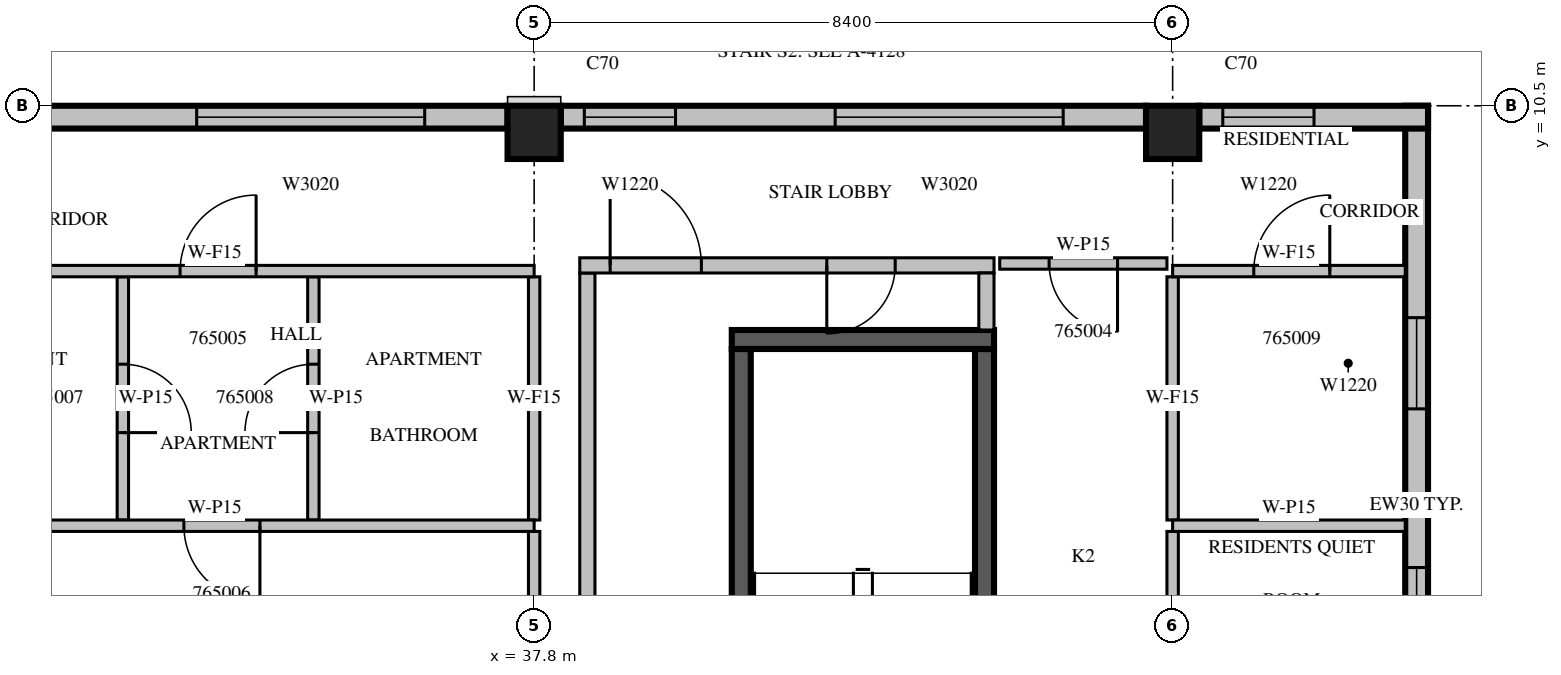
"""IFC4 building model, lengths in metres.
Left out: names, types, materials, properties, quantities, classifications, styles, units other than length and angle.
Written with IfcOpenShell. Run it as: python <this file> out.ifc"""

import sys

from ifc_helpers import new_model, si_unit, direction, frame, frame_2d, origin, origin_2d, place, context, subcontext, project, spatial, rectangle, extrude, source, transform, mapped, element, fill, save


model = new_model("IFC4")
c1 = context("Model", 3, precision=1e-05, world=origin(), true_north=direction((0.0, 1.0)))
c2 = subcontext(c1, "Body", "Model", "MODEL_VIEW")
j1 = project(units=[si_unit("LENGTHUNIT", "METRE"), si_unit("PLANEANGLEUNIT", "RADIAN")], contexts=[c1])
p1 = place(None, origin())
s1 = spatial("IfcSite", under=j1, at=p1, CompositionType="ELEMENT")
p2 = place(p1, origin())
s2 = spatial("IfcBuilding", under=s1, at=p2, CompositionType="ELEMENT")
p3 = place(p2, frame((0.0, 0.0, 288.0)))
s3 = spatial("IfcBuildingStorey", under=s2, at=p3, CompositionType="ELEMENT", Elevation=288.0)
m1 = source(origin(), c2, "Body", "SweptSolid", [
    extrude(rectangle(XDim=0.7, YDim=0.7, at=origin_2d()), origin(), (0.0, 0.0, 1.0), 3.5),
])
for number, where, z_axis, x_axis in (
    (1, (37.8, 10.15, 0.0), (0.0, 0.0, 1.0), (1.0, 0.0, 0.0)),
    (2, (46.2, 10.15, 0.0), (0.0, 0.0, 1.0), (1.0, 0.0, 0.0)),
):
    element("IfcColumn", number, at=place(p3, frame(where, z_axis=z_axis, x_axis=x_axis)), inside=s3, PredefinedType="COLUMN", context=c2, shape_type="MappedRepresentation", body=[
        mapped(m1, transform((0.0, 0.0, 0.0), scale=1.0)),
    ])
m2 = source(origin(), c2, "Body", "SweptSolid", [
    extrude(rectangle(XDim=10.5, YDim=0.3, at=frame_2d((5.25, 0.0))), origin(), (0.0, 0.0, 1.0), 3.1),
])
p4 = place(p3, frame((49.41, 0.0, 0.0), z_axis=(0.0, 0.0, 1.0), x_axis=(0.0, 1.0, 0.0)))
e3 = element("IfcWall", 3, at=p4, inside=s3, PredefinedType="STANDARD", context=c2, shape_type="MappedRepresentation", body=[
    mapped(m2, transform((0.0, 0.0, 0.0), scale=1.0)),
])
m3 = source(origin(), c2, "Body", "SweptSolid", [
    extrude(rectangle(XDim=3.6, YDim=2.0, at=frame_2d((1.8, 1.0))), frame((0.0, 0.16, 0.0), z_axis=(0.0, -1.0, 0.0), x_axis=(1.0, 0.0, 0.0)), (0.0, 0.0, 1.0), 0.32),
])
p5 = place(p4, frame((0.825, 0.0, 0.6)))
e4 = element("IfcOpeningElement", 4, at=p5, cuts=e3, PredefinedType="OPENING", context=c2, shape_type="MappedRepresentation", body=[
    mapped(m3, transform((0.0, 0.0, 0.0), scale=1.0)),
])
m4 = source(origin(), c2, "Body", "SweptSolid", [
    extrude(rectangle(XDim=1.2, YDim=2.0, at=frame_2d((0.6, 1.0))), frame((0.0, 0.16, 0.0), z_axis=(0.0, -1.0, 0.0), x_axis=(1.0, 0.0, 0.0)), (0.0, 0.0, 1.0), 0.32),
])
p6 = place(p4, frame((6.513, 0.0, 0.6)))
e5 = element("IfcOpeningElement", 5, at=p6, cuts=e3, PredefinedType="OPENING", context=c2, shape_type="MappedRepresentation", body=[
    mapped(m4, transform((0.0, 0.0, 0.0), scale=1.0)),
])
m5 = source(origin(), c2, "Body", "SweptSolid", [
    extrude(rectangle(XDim=3.01, YDim=0.3, at=frame_2d((1.505, 0.0))), origin(), (0.0, 0.0, 1.0), 3.1),
])
p7 = place(p3, frame((49.56, 10.35, 0.0), z_axis=(0.0, 0.0, 1.0), x_axis=(-1.0, 0.0, 0.0)))
e6 = element("IfcWall", 6, at=p7, inside=s3, PredefinedType="STANDARD", context=c2, shape_type="MappedRepresentation", body=[
    mapped(m5, transform((0.0, 0.0, 0.0), scale=1.0)),
])
p8 = place(p7, frame((1.5, 0.0, 0.6)))
e7 = element("IfcOpeningElement", 7, at=p8, cuts=e6, PredefinedType="OPENING", context=c2, shape_type="MappedRepresentation", body=[
    mapped(m4, transform((0.0, 0.0, 0.0), scale=1.0)),
])
m6 = source(origin(), c2, "Body", "SweptSolid", [
    extrude(rectangle(XDim=7.7, YDim=0.3, at=frame_2d((3.85, 0.0))), origin(), (0.0, 0.0, 1.0), 3.1),
])
p9 = place(p3, frame((45.85, 10.35, 0.0), z_axis=(0.0, 0.0, 1.0), x_axis=(-1.0, 0.0, 0.0)))
e8 = element("IfcWall", 8, at=p9, inside=s3, PredefinedType="STANDARD", context=c2, shape_type="MappedRepresentation", body=[
    mapped(m6, transform((0.0, 0.0, 0.0), scale=1.0)),
])
m7 = source(origin(), c2, "Body", "SweptSolid", [
    extrude(rectangle(XDim=3.0, YDim=2.0, at=frame_2d((1.5, 1.0))), frame((0.0, 0.16, 0.0), z_axis=(0.0, -1.0, 0.0), x_axis=(1.0, 0.0, 0.0)), (0.0, 0.0, 1.0), 0.32),
])
p10 = place(p9, frame((1.09, 0.0, 0.6)))
e9 = element("IfcOpeningElement", 9, at=p10, cuts=e8, PredefinedType="OPENING", context=c2, shape_type="MappedRepresentation", body=[
    mapped(m7, transform((0.0, 0.0, 0.0), scale=1.0)),
])
p11 = place(p9, frame((6.19, 0.0, 0.6)))
e10 = element("IfcOpeningElement", 10, at=p11, cuts=e8, PredefinedType="OPENING", context=c2, shape_type="MappedRepresentation", body=[
    mapped(m4, transform((0.0, 0.0, 0.0), scale=1.0)),
])
p12 = place(p3, frame((37.45, 10.35, 0.0), z_axis=(0.0, 0.0, 1.0), x_axis=(-1.0, 0.0, 0.0)))
e11 = element("IfcWall", 11, at=p12, inside=s3, PredefinedType="STANDARD", context=c2, shape_type="MappedRepresentation", body=[
    mapped(m6, transform((0.0, 0.0, 0.0), scale=1.0)),
])
p13 = place(p12, frame((1.09, 0.0, 0.6)))
e12 = element("IfcOpeningElement", 12, at=p13, cuts=e11, PredefinedType="OPENING", context=c2, shape_type="MappedRepresentation", body=[
    mapped(m7, transform((0.0, 0.0, 0.0), scale=1.0)),
])
p14 = place(p12, frame((6.19, 0.0, 0.6)))
e13 = element("IfcOpeningElement", 13, at=p14, cuts=e11, PredefinedType="OPENING", context=c2, shape_type="MappedRepresentation", body=[
    mapped(m4, transform((0.0, 0.0, 0.0), scale=1.0)),
])
m8 = source(origin(), c2, "Body", "SweptSolid", [
    extrude(rectangle(XDim=7.0, YDim=0.25, at=frame_2d((3.5, 0.0))), origin(), (0.0, 0.0, 1.0), 3.1),
])
p15 = place(p3, frame((40.525, 0.3, 0.0), z_axis=(0.0, 0.0, 1.0), x_axis=(0.0, 1.0, 0.0)))
e14 = element("IfcWall", 14, at=p15, inside=s3, PredefinedType="SOLIDWALL", context=c2, shape_type="MappedRepresentation", body=[
    mapped(m8, transform((0.0, 0.0, 0.0), scale=1.0)),
])
m9 = source(origin(), c2, "Body", "SweptSolid", [
    extrude(rectangle(XDim=1.1, YDim=2.1, at=frame_2d((0.55, 1.05))), frame((0.0, 0.135, 0.0), z_axis=(0.0, -1.0, 0.0), x_axis=(1.0, 0.0, 0.0)), (0.0, 0.0, 1.0), 0.27),
])
p16 = place(p15, frame((0.55, 0.0, 0.0)))
e15 = element("IfcOpeningElement", 15, at=p16, cuts=e14, PredefinedType="OPENING", context=c2, shape_type="MappedRepresentation", body=[
    mapped(m9, transform((0.0, 0.0, 0.0), scale=1.0)),
])
p17 = place(p3, frame((43.725, 0.3, 0.0), z_axis=(0.0, 0.0, 1.0), x_axis=(0.0, 1.0, 0.0)))
e16 = element("IfcWall", 16, at=p17, inside=s3, PredefinedType="SOLIDWALL", context=c2, shape_type="MappedRepresentation", body=[
    mapped(m8, transform((0.0, 0.0, 0.0), scale=1.0)),
])
m10 = source(origin(), c2, "Body", "SweptSolid", [
    extrude(rectangle(XDim=3.45, YDim=0.25, at=frame_2d((1.725, 0.0))), origin(), (0.0, 0.0, 1.0), 3.1),
])
p18 = place(p3, frame((40.4, 7.425, 0.0), z_axis=(0.0, 0.0, 1.0), x_axis=(1.0, 0.0, 0.0)))
e17 = element("IfcWall", 17, at=p18, inside=s3, PredefinedType="SOLIDWALL", context=c2, shape_type="MappedRepresentation", body=[
    mapped(m10, transform((0.0, 0.0, 0.0), scale=1.0)),
])
m11 = source(origin(), c2, "Body", "SweptSolid", [
    extrude(rectangle(XDim=8.0, YDim=0.2, at=frame_2d((4.0, 0.0))), origin(), (0.0, 0.0, 1.0), 3.1),
])
p19 = place(p3, frame((38.5, 0.3, 0.0), z_axis=(0.0, 0.0, 1.0), x_axis=(0.0, 1.0, 0.0)))
e18 = element("IfcWall", 18, at=p19, inside=s3, PredefinedType="PARTITIONING", context=c2, shape_type="MappedRepresentation", body=[
    mapped(m11, transform((0.0, 0.0, 0.0), scale=1.0)),
])
m12 = source(origin(), c2, "Body", "SweptSolid", [
    extrude(rectangle(XDim=5.45, YDim=0.2, at=frame_2d((2.725, 0.0))), origin(), (0.0, 0.0, 1.0), 3.1),
])
p20 = place(p3, frame((38.4, 8.4, 0.0), z_axis=(0.0, 0.0, 1.0), x_axis=(1.0, 0.0, 0.0)))
e19 = element("IfcWall", 19, at=p20, inside=s3, PredefinedType="PARTITIONING", context=c2, shape_type="MappedRepresentation", body=[
    mapped(m12, transform((0.0, 0.0, 0.0), scale=1.0)),
])
m13 = source(origin(), c2, "Body", "SweptSolid", [
    extrude(rectangle(XDim=1.2, YDim=2.1, at=frame_2d((0.6, 1.05))), frame((0.0, 0.11, 0.0), z_axis=(0.0, -1.0, 0.0), x_axis=(1.0, 0.0, 0.0)), (0.0, 0.0, 1.0), 0.22),
])
p21 = place(p20, frame((0.4, 0.0, 0.0)))
e20 = element("IfcOpeningElement", 20, at=p21, cuts=e19, PredefinedType="OPENING", context=c2, shape_type="MappedRepresentation", body=[
    mapped(m13, transform((0.0, 0.0, 0.0), scale=1.0)),
])
m14 = source(origin(), c2, "Body", "SweptSolid", [
    extrude(rectangle(XDim=0.9, YDim=2.1, at=frame_2d((0.45, 1.05))), frame((0.0, 0.11, 0.0), z_axis=(0.0, -1.0, 0.0), x_axis=(1.0, 0.0, 0.0)), (0.0, 0.0, 1.0), 0.22),
])
p22 = place(p20, frame((3.25, 0.0, 0.0)))
e21 = element("IfcOpeningElement", 21, at=p22, cuts=e19, PredefinedType="OPENING", context=c2, shape_type="MappedRepresentation", body=[
    mapped(m14, transform((0.0, 0.0, 0.0), scale=1.0)),
])
m15 = source(origin(), c2, "Body", "SweptSolid", [
    extrude(rectangle(XDim=0.75, YDim=0.2, at=frame_2d((0.375, 0.0))), origin(), (0.0, 0.0, 1.0), 3.1),
])
p23 = place(p3, frame((43.75, 7.55, 0.0), z_axis=(0.0, 0.0, 1.0), x_axis=(0.0, 1.0, 0.0)))
e22 = element("IfcWall", 22, at=p23, inside=s3, PredefinedType="PARTITIONING", context=c2, shape_type="MappedRepresentation", body=[
    mapped(m15, transform((0.0, 0.0, 0.0), scale=1.0)),
])
m16 = source(origin(), c2, "Body", "SweptSolid", [
    extrude(rectangle(XDim=2.2, YDim=0.15, at=frame_2d((1.1, 0.0))), origin(), (0.0, 0.0, 1.0), 3.1),
])
p24 = place(p3, frame((46.125, 8.425, 0.0), z_axis=(0.0, 0.0, 1.0), x_axis=(-1.0, 0.0, 0.0)))
e23 = element("IfcWall", 23, at=p24, inside=s3, PredefinedType="PARTITIONING", context=c2, shape_type="MappedRepresentation", body=[
    mapped(m16, transform((0.0, 0.0, 0.0), scale=1.0)),
])
m17 = source(origin(), c2, "Body", "SweptSolid", [
    extrude(rectangle(XDim=0.9, YDim=2.1, at=frame_2d((0.45, 1.05))), frame((0.0, 0.085, 0.0), z_axis=(0.0, -1.0, 0.0), x_axis=(1.0, 0.0, 0.0)), (0.0, 0.0, 1.0), 0.17),
])
p25 = place(p24, frame((0.65, 0.0, 0.0)))
e24 = element("IfcOpeningElement", 24, at=p25, cuts=e23, PredefinedType="OPENING", context=c2, shape_type="MappedRepresentation", body=[
    mapped(m17, transform((0.0, 0.0, 0.0), scale=1.0)),
])
m18 = source(origin(), c2, "Body", "SweptSolid", [
    extrude(rectangle(XDim=3.2, YDim=0.15, at=frame_2d((1.6, 0.0))), origin(), (0.0, 0.0, 1.0), 3.1),
])
p26 = place(p3, frame((32.389, 5.05, 0.0), z_axis=(0.0, 0.0, 1.0), x_axis=(0.0, 1.0, 0.0)))
e25 = element("IfcWall", 25, at=p26, inside=s3, PredefinedType="PARTITIONING", context=c2, shape_type="MappedRepresentation", body=[
    mapped(m18, transform((0.0, 0.0, 0.0), scale=1.0)),
])
p27 = place(p26, frame((1.15, 0.0, 0.0)))
e26 = element("IfcOpeningElement", 26, at=p27, cuts=e25, PredefinedType="OPENING", context=c2, shape_type="MappedRepresentation", body=[
    mapped(m17, transform((0.0, 0.0, 0.0), scale=1.0)),
])
p28 = place(p3, frame((34.895, 5.05, 0.0), z_axis=(0.0, 0.0, 1.0), x_axis=(0.0, 1.0, 0.0)))
e27 = element("IfcWall", 27, at=p28, inside=s3, PredefinedType="PARTITIONING", context=c2, shape_type="MappedRepresentation", body=[
    mapped(m18, transform((0.0, 0.0, 0.0), scale=1.0)),
])
p29 = place(p28, frame((1.15, 0.0, 0.0)))
e28 = element("IfcOpeningElement", 28, at=p29, cuts=e27, PredefinedType="OPENING", context=c2, shape_type="MappedRepresentation", body=[
    mapped(m17, transform((0.0, 0.0, 0.0), scale=1.0)),
])
m19 = source(origin(), c2, "Body", "SweptSolid", [
    extrude(rectangle(XDim=4.201, YDim=0.15, at=frame_2d((2.1, 0.0))), origin(), (0.0, 0.0, 1.0), 3.1),
])
p30 = place(p3, frame((37.8, 0.699, 0.0), z_axis=(0.0, 0.0, 1.0), x_axis=(0.0, 1.0, 0.0)))
e29 = element("IfcWall", 29, at=p30, inside=s3, PredefinedType="PARTITIONING", context=c2, shape_type="MappedRepresentation", body=[
    mapped(m19, transform((0.0, 0.0, 0.0), scale=1.0)),
])
p31 = place(p3, frame((37.8, 5.05, 0.0), z_axis=(0.0, 0.0, 1.0), x_axis=(0.0, 1.0, 0.0)))
e30 = element("IfcWall", 30, at=p31, inside=s3, PredefinedType="PARTITIONING", context=c2, shape_type="MappedRepresentation", body=[
    mapped(m18, transform((0.0, 0.0, 0.0), scale=1.0)),
])
m20 = source(origin(), c2, "Body", "SweptSolid", [
    extrude(rectangle(XDim=8.4, YDim=0.15, at=frame_2d((4.2, 0.0))), origin(), (0.0, 0.0, 1.0), 3.1),
])
p32 = place(p3, frame((37.8, 4.975, 0.0), z_axis=(0.0, 0.0, 1.0), x_axis=(-1.0, 0.0, 0.0)))
e31 = element("IfcWall", 31, at=p32, inside=s3, PredefinedType="PARTITIONING", context=c2, shape_type="MappedRepresentation", body=[
    mapped(m20, transform((0.0, 0.0, 0.0), scale=1.0)),
])
m21 = source(origin(), c2, "Body", "SweptSolid", [
    extrude(rectangle(XDim=1.0, YDim=2.1, at=frame_2d((0.5, 1.05))), frame((0.0, 0.085, 0.0), z_axis=(0.0, -1.0, 0.0), x_axis=(1.0, 0.0, 0.0)), (0.0, 0.0, 1.0), 0.17),
])
p33 = place(p32, frame((3.608, 0.0, 0.0)))
e32 = element("IfcOpeningElement", 32, at=p33, cuts=e31, PredefinedType="OPENING", context=c2, shape_type="MappedRepresentation", body=[
    mapped(m21, transform((0.0, 0.0, 0.0), scale=1.0)),
])
p34 = place(p3, frame((46.2, 0.699, 0.0), z_axis=(0.0, 0.0, 1.0), x_axis=(0.0, 1.0, 0.0)))
e33 = element("IfcWall", 33, at=p34, inside=s3, PredefinedType="PARTITIONING", context=c2, shape_type="MappedRepresentation", body=[
    mapped(m19, transform((0.0, 0.0, 0.0), scale=1.0)),
])
p35 = place(p3, frame((46.2, 5.05, 0.0), z_axis=(0.0, 0.0, 1.0), x_axis=(0.0, 1.0, 0.0)))
e34 = element("IfcWall", 34, at=p35, inside=s3, PredefinedType="PARTITIONING", context=c2, shape_type="MappedRepresentation", body=[
    mapped(m18, transform((0.0, 0.0, 0.0), scale=1.0)),
])
m22 = source(origin(), c2, "Body", "SweptSolid", [
    extrude(rectangle(XDim=3.06, YDim=0.15, at=frame_2d((1.53, 0.0))), origin(), (0.0, 0.0, 1.0), 3.1),
])
p36 = place(p3, frame((49.26, 4.975, 0.0), z_axis=(0.0, 0.0, 1.0), x_axis=(-1.0, 0.0, 0.0)))
e35 = element("IfcWall", 35, at=p36, inside=s3, PredefinedType="PARTITIONING", context=c2, shape_type="MappedRepresentation", body=[
    mapped(m22, transform((0.0, 0.0, 0.0), scale=1.0)),
])
p37 = place(p3, frame((37.8, 8.325, 0.0), z_axis=(0.0, 0.0, 1.0), x_axis=(-1.0, 0.0, 0.0)))
e36 = element("IfcWall", 36, at=p37, inside=s3, PredefinedType="PARTITIONING", context=c2, shape_type="MappedRepresentation", body=[
    mapped(m20, transform((0.0, 0.0, 0.0), scale=1.0)),
])
p38 = place(p37, frame((3.658, 0.0, 0.0)))
e37 = element("IfcOpeningElement", 37, at=p38, cuts=e36, PredefinedType="OPENING", context=c2, shape_type="MappedRepresentation", body=[
    mapped(m21, transform((0.0, 0.0, 0.0), scale=1.0)),
])
p39 = place(p3, frame((49.26, 8.325, 0.0), z_axis=(0.0, 0.0, 1.0), x_axis=(-1.0, 0.0, 0.0)))
e38 = element("IfcWall", 38, at=p39, inside=s3, PredefinedType="PARTITIONING", context=c2, shape_type="MappedRepresentation", body=[
    mapped(m22, transform((0.0, 0.0, 0.0), scale=1.0)),
])
p40 = place(p39, frame((0.993, 0.0, 0.0)))
e39 = element("IfcOpeningElement", 39, at=p40, cuts=e38, PredefinedType="OPENING", context=c2, shape_type="MappedRepresentation", body=[
    mapped(m21, transform((0.0, 0.0, 0.0), scale=1.0)),
])
m23 = source(origin(), c2, "Body", "SweptSolid", [
    extrude(rectangle(XDim=3.6, YDim=2.0, at=frame_2d((1.8, 1.0))), frame((0.0, 0.03, 0.0), z_axis=(0.0, -1.0, 0.0), x_axis=(1.0, 0.0, 0.0)), (0.0, 0.0, 1.0), 0.06),
])
p41 = place(p5, origin())
e40 = element("IfcWindow", 40, at=p41, inside=s3, PartitioningType="SINGLE_PANEL", PredefinedType="WINDOW", context=c2, shape_type="MappedRepresentation", body=[
    mapped(m23, transform((0.0, 0.0, 0.0), scale=1.0)),
])
fill(e4, e40)
m24 = source(origin(), c2, "Body", "SweptSolid", [
    extrude(rectangle(XDim=1.2, YDim=2.0, at=frame_2d((0.6, 1.0))), frame((0.0, 0.03, 0.0), z_axis=(0.0, -1.0, 0.0), x_axis=(1.0, 0.0, 0.0)), (0.0, 0.0, 1.0), 0.06),
])
p42 = place(p6, origin())
e41 = element("IfcWindow", 41, at=p42, inside=s3, PartitioningType="SINGLE_PANEL", PredefinedType="WINDOW", context=c2, shape_type="MappedRepresentation", body=[
    mapped(m24, transform((0.0, 0.0, 0.0), scale=1.0)),
])
fill(e5, e41)
p43 = place(p8, origin())
e42 = element("IfcWindow", 42, at=p43, inside=s3, PartitioningType="SINGLE_PANEL", PredefinedType="WINDOW", context=c2, shape_type="MappedRepresentation", body=[
    mapped(m24, transform((0.0, 0.0, 0.0), scale=1.0)),
])
fill(e7, e42)
m25 = source(origin(), c2, "Body", "SweptSolid", [
    extrude(rectangle(XDim=3.0, YDim=2.0, at=frame_2d((1.5, 1.0))), frame((0.0, 0.03, 0.0), z_axis=(0.0, -1.0, 0.0), x_axis=(1.0, 0.0, 0.0)), (0.0, 0.0, 1.0), 0.06),
])
p44 = place(p10, origin())
e43 = element("IfcWindow", 43, at=p44, inside=s3, PartitioningType="SINGLE_PANEL", PredefinedType="WINDOW", context=c2, shape_type="MappedRepresentation", body=[
    mapped(m25, transform((0.0, 0.0, 0.0), scale=1.0)),
])
fill(e9, e43)
p45 = place(p11, origin())
e44 = element("IfcWindow", 44, at=p45, inside=s3, PartitioningType="SINGLE_PANEL", PredefinedType="WINDOW", context=c2, shape_type="MappedRepresentation", body=[
    mapped(m24, transform((0.0, 0.0, 0.0), scale=1.0)),
])
fill(e10, e44)
p46 = place(p13, origin())
e45 = element("IfcWindow", 45, at=p46, inside=s3, PartitioningType="SINGLE_PANEL", PredefinedType="WINDOW", context=c2, shape_type="MappedRepresentation", body=[
    mapped(m25, transform((0.0, 0.0, 0.0), scale=1.0)),
])
fill(e12, e45)
m26 = source(origin(), c2, "Body", "SweptSolid", [
    extrude(rectangle(XDim=1.2, YDim=2.1, at=frame_2d((0.6, 1.05))), frame((0.0, 0.025, 0.0), z_axis=(0.0, -1.0, 0.0), x_axis=(1.0, 0.0, 0.0)), (0.0, 0.0, 1.0), 0.05),
])
p47 = place(p21, origin())
e46 = element("IfcDoor", 46, at=p47, inside=s3, OperationType="SINGLE_SWING_LEFT", PredefinedType="DOOR", context=c2, shape_type="MappedRepresentation", body=[
    mapped(m26, transform((0.0, 0.0, 0.0), scale=1.0)),
])
fill(e20, e46)
m27 = source(origin(), c2, "Body", "SweptSolid", [
    extrude(rectangle(XDim=0.9, YDim=2.1, at=frame_2d((0.45, 1.05))), frame((0.0, 0.025, 0.0), z_axis=(0.0, -1.0, 0.0), x_axis=(1.0, 0.0, 0.0)), (0.0, 0.0, 1.0), 0.05),
])
p48 = place(p22, origin())
e47 = element("IfcDoor", 47, at=p48, inside=s3, OperationType="SINGLE_SWING_RIGHT", PredefinedType="DOOR", context=c2, shape_type="MappedRepresentation", body=[
    mapped(m27, transform((0.0, 0.0, 0.0), scale=1.0)),
])
fill(e21, e47)
p49 = place(p25, origin())
e48 = element("IfcDoor", 48, at=p49, inside=s3, OperationType="SINGLE_SWING_LEFT", PredefinedType="DOOR", context=c2, shape_type="MappedRepresentation", body=[
    mapped(m27, transform((0.0, 0.0, 0.0), scale=1.0)),
])
fill(e24, e48)
m28 = source(origin(), c2, "Body", "SweptSolid", [
    extrude(rectangle(XDim=1.0, YDim=2.1, at=frame_2d((0.5, 1.05))), frame((0.0, 0.025, 0.0), z_axis=(0.0, -1.0, 0.0), x_axis=(1.0, 0.0, 0.0)), (0.0, 0.0, 1.0), 0.05),
])
p50 = place(p38, origin())
e49 = element("IfcDoor", 49, at=p50, inside=s3, OperationType="SINGLE_SWING_RIGHT", PredefinedType="DOOR", context=c2, shape_type="MappedRepresentation", body=[
    mapped(m28, transform((0.0, 0.0, 0.0), scale=1.0)),
])
fill(e37, e49)
p51 = place(p33, origin())
e50 = element("IfcDoor", 50, at=p51, inside=s3, OperationType="SINGLE_SWING_LEFT", PredefinedType="DOOR", context=c2, shape_type="MappedRepresentation", body=[
    mapped(m28, transform((0.0, 0.0, 0.0), scale=1.0)),
])
fill(e32, e50)
p52 = place(p27, origin())
e51 = element("IfcDoor", 51, at=p52, inside=s3, OperationType="SINGLE_SWING_RIGHT", PredefinedType="DOOR", context=c2, shape_type="MappedRepresentation", body=[
    mapped(m27, transform((0.0, 0.0, 0.0), scale=1.0)),
])
fill(e26, e51)
p53 = place(p29, origin())
e52 = element("IfcDoor", 52, at=p53, inside=s3, OperationType="SINGLE_SWING_LEFT", PredefinedType="DOOR", context=c2, shape_type="MappedRepresentation", body=[
    mapped(m27, transform((0.0, 0.0, 0.0), scale=1.0)),
])
fill(e28, e52)
p54 = place(p40, origin())
e53 = element("IfcDoor", 53, at=p54, inside=s3, OperationType="SINGLE_SWING_RIGHT", PredefinedType="DOOR", context=c2, shape_type="MappedRepresentation", body=[
    mapped(m28, transform((0.0, 0.0, 0.0), scale=1.0)),
])
fill(e39, e53)
save(model, sys.argv[1])
